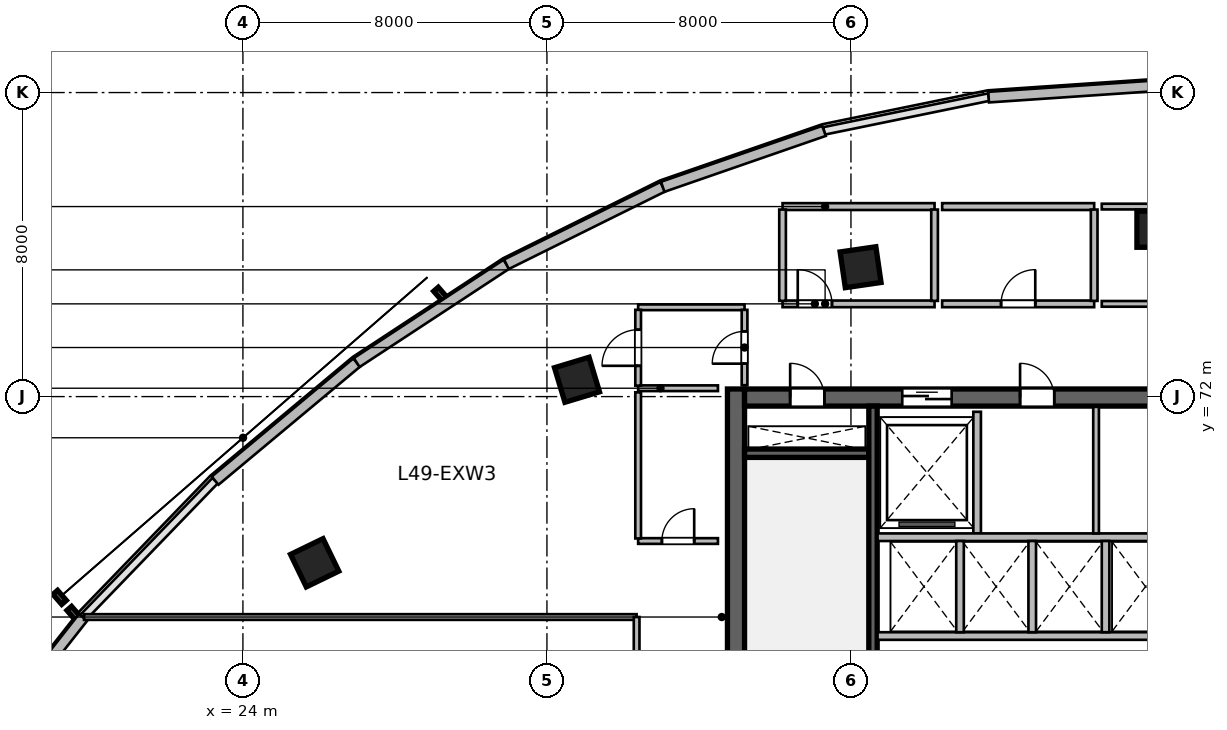
"""IFC4 building model, lengths in metres.
Left out: names, types, materials, properties, quantities, classifications, styles, units other than length and angle.
Written with IfcOpenShell. Run it as: python <this file> out.ifc"""

import sys

from ifc_helpers import new_model, si_unit, direction, frame, frame_2d, origin, origin_2d, place, context, subcontext, project, spatial, rectangle, extrude, source, transform, mapped, element, fill, save


model = new_model("IFC4")
c1 = context("Model", 3, precision=1e-05, world=origin(), true_north=direction((0.0, 1.0)))
c2 = subcontext(c1, "Body", "Model", "MODEL_VIEW")
j1 = project(units=[si_unit("LENGTHUNIT", "METRE"), si_unit("PLANEANGLEUNIT", "RADIAN")], contexts=[c1])
p1 = place(None, origin())
s1 = spatial("IfcSite", under=j1, at=p1, CompositionType="ELEMENT")
p2 = place(p1, origin())
s2 = spatial("IfcBuilding", under=s1, at=p2, CompositionType="ELEMENT")
p3 = place(p2, frame((0.0, 0.0, 204.0)))
s3 = spatial("IfcBuildingStorey", under=s2, at=p3, CompositionType="ELEMENT", Elevation=204.0)
m1 = source(origin(), c2, "Body", "SweptSolid", [
    extrude(rectangle(XDim=12.0, YDim=0.45, at=frame_2d((6.0, 0.0))), origin(), (0.0, 0.0, 1.0), 3.9),
])
p4 = place(p3, frame((36.975, 60.2, 0.0), z_axis=(0.0, 0.0, 1.0), x_axis=(0.0, 1.0, 0.0)))
e1 = element("IfcWall", 1, at=p4, inside=s3, PredefinedType="SHEAR", context=c2, shape_type="MappedRepresentation", body=[
    mapped(m1, transform((0.0, 0.0, 0.0), scale=1.0)),
])
m2 = source(origin(), c2, "Body", "SweptSolid", [
    extrude(rectangle(XDim=21.6, YDim=0.45, at=frame_2d((10.8, 0.0))), origin(), (0.0, 0.0, 1.0), 3.9),
])
p5 = place(p3, frame((37.2, 71.975, 0.0), z_axis=(0.0, 0.0, 1.0), x_axis=(1.0, 0.0, 0.0)))
e2 = element("IfcWall", 2, at=p5, inside=s3, PredefinedType="SHEAR", context=c2, shape_type="MappedRepresentation", body=[
    mapped(m2, transform((0.0, 0.0, 0.0), scale=1.0)),
])
p6 = place(p5, frame((1.2, 0.0, 0.0)))
e3 = element("IfcOpeningElement", 3, at=p6, cuts=e2, PredefinedType="OPENING", context=c2, shape_type="SweptSolid", body=[
    extrude(rectangle(XDim=0.9, YDim=2.1, at=frame_2d((0.45, 1.05))), frame((0.0, 0.235, 0.0), z_axis=(0.0, -1.0, 0.0), x_axis=(1.0, 0.0, 0.0)), (0.0, 0.0, 1.0), 0.47),
])
p7 = place(p5, frame((14.7, 0.0, 0.0)))
e4 = element("IfcOpeningElement", 4, at=p7, cuts=e2, PredefinedType="OPENING", context=c2, shape_type="SweptSolid", body=[
    extrude(rectangle(XDim=1.2, YDim=2.15, at=frame_2d((0.6, 1.075))), frame((0.0, 0.235, 0.0), z_axis=(0.0, -1.0, 0.0), x_axis=(1.0, 0.0, 0.0)), (0.0, 0.0, 1.0), 0.47),
])
p8 = place(p5, frame((4.15, 0.0, 0.0)))
e5 = element("IfcOpeningElement", 5, at=p8, cuts=e2, PredefinedType="OPENING", context=c2, shape_type="SweptSolid", body=[
    extrude(rectangle(XDim=1.3, YDim=2.15, at=frame_2d((0.65, 1.075))), frame((0.0, 0.235, 0.0), z_axis=(0.0, -1.0, 0.0), x_axis=(1.0, 0.0, 0.0)), (0.0, 0.0, 1.0), 0.47),
])
p9 = place(p5, frame((7.25, 0.0, 0.0)))
e6 = element("IfcOpeningElement", 6, at=p9, cuts=e2, PredefinedType="OPENING", context=c2, shape_type="SweptSolid", body=[
    extrude(rectangle(XDim=0.9, YDim=2.1, at=frame_2d((0.45, 1.05))), frame((0.0, 0.235, 0.0), z_axis=(0.0, -1.0, 0.0), x_axis=(1.0, 0.0, 0.0)), (0.0, 0.0, 1.0), 0.47),
])
p10 = place(p5, frame((10.95, 0.0, 0.0)))
e7 = element("IfcOpeningElement", 7, at=p10, cuts=e2, PredefinedType="OPENING", context=c2, shape_type="SweptSolid", body=[
    extrude(rectangle(XDim=0.9, YDim=2.1, at=frame_2d((0.45, 1.05))), frame((0.0, 0.235, 0.0), z_axis=(0.0, -1.0, 0.0), x_axis=(1.0, 0.0, 0.0)), (0.0, 0.0, 1.0), 0.47),
])
m3 = source(origin(), c2, "Body", "SweptSolid", [
    extrude(rectangle(XDim=3.27, YDim=0.22, at=frame_2d((1.635, 0.0))), origin(), (0.0, 0.0, 1.0), 3.9),
])
p11 = place(p3, frame((37.2, 70.51, 0.0), z_axis=(0.0, 0.0, 1.0), x_axis=(1.0, 0.0, 0.0)))
e8 = element("IfcWall", 8, at=p11, inside=s3, PredefinedType="SHEAR", context=c2, shape_type="MappedRepresentation", body=[
    mapped(m3, transform((0.0, 0.0, 0.0), scale=1.0)),
])
m4 = source(origin(), c2, "Body", "SweptSolid", [
    extrude(rectangle(XDim=11.1, YDim=0.22, at=frame_2d((5.55, 0.0))), origin(), (0.0, 0.0, 1.0), 3.9),
])
p12 = place(p3, frame((40.58, 60.65, 0.0), z_axis=(0.0, 0.0, 1.0), x_axis=(0.0, 1.0, 0.0)))
e9 = element("IfcWall", 9, at=p12, inside=s3, PredefinedType="SHEAR", context=c2, shape_type="MappedRepresentation", body=[
    mapped(m4, transform((0.0, 0.0, 0.0), scale=1.0)),
])
m5 = source(origin(), c2, "Body", "SweptSolid", [
    extrude(rectangle(XDim=0.95, YDim=0.95, at=origin_2d()), origin(), (0.0, 0.0, 1.0), 3.9),
])
for number, where, z_axis, x_axis in (
    (10, (25.888, 67.627, 0.0), (0.0, 0.0, 1.0), (-0.436, 0.9, 0.0)),
    (11, (32.791, 72.442, 0.0), (0.0, 0.0, 1.0), (-0.289, 0.957, 0.0)),
    (12, (40.253, 75.404, 0.0), (0.0, 0.0, 1.0), (-0.143, 0.99, 0.0)),
    (13, (48.0, 76.404, 0.0), (0.0, 0.0, 1.0), (0.0, 1.0, 0.0)),
):
    element("IfcColumn", number, at=place(p3, frame(where, z_axis=z_axis, x_axis=x_axis)), inside=s3, PredefinedType="COLUMN", context=c2, shape_type="MappedRepresentation", body=[
        mapped(m5, transform((0.0, 0.0, 0.0), scale=1.0)),
    ])
m6 = source(origin(), c2, "Body", "SweptSolid", [
    extrude(rectangle(XDim=5.153, YDim=0.28, at=frame_2d((2.577, 0.0))), origin(), (0.0, 0.0, 1.0), 3.64),
])
p13 = place(p3, frame((16.609, 62.14, 0.0), z_axis=(0.0, 0.0, 1.0), x_axis=(0.618179283891, 0.786037132054, 0.0)))
e14 = element("IfcWall", 14, at=p13, inside=s3, PredefinedType="SOLIDWALL", context=c2, shape_type="MappedRepresentation", body=[
    mapped(m6, transform((0.0, 0.0, 0.0), scale=1.0)),
])
m7 = source(origin(), c2, "Body", "SweptSolid", [
    extrude(rectangle(XDim=4.852, YDim=0.28, at=frame_2d((2.426, 0.0))), origin(), (0.0, 0.0, 1.0), 3.64),
])
p14 = place(p3, frame((23.268, 69.788, 0.0), z_axis=(0.0, 0.0, 1.0), x_axis=(0.767936605821, 0.640525853843, 0.0)))
e15 = element("IfcWall", 15, at=p14, inside=s3, PredefinedType="SOLIDWALL", context=c2, shape_type="MappedRepresentation", body=[
    mapped(m7, transform((0.0, 0.0, 0.0), scale=1.0)),
])
m8 = source(origin(), c2, "Body", "SweptSolid", [
    extrude(rectangle(XDim=4.713, YDim=0.28, at=frame_2d((2.356, 0.0))), origin(), (0.0, 0.0, 1.0), 3.64),
])
p15 = place(p3, frame((26.994, 72.896, 0.0), z_axis=(0.0, 0.0, 1.0), x_axis=(0.835974386457, 0.548768462275, 0.0)))
e16 = element("IfcWall", 16, at=p15, inside=s3, PredefinedType="SOLIDWALL", context=c2, shape_type="MappedRepresentation", body=[
    mapped(m8, transform((0.0, 0.0, 0.0), scale=1.0)),
])
m9 = source(origin(), c2, "Body", "SweptSolid", [
    extrude(rectangle(XDim=4.59, YDim=0.28, at=frame_2d((2.295, 0.0))), origin(), (0.0, 0.0, 1.0), 3.64),
])
p16 = place(p3, frame((30.934, 75.482, 0.0), z_axis=(0.0, 0.0, 1.0), x_axis=(0.895974834987, 0.444104824418, 0.0)))
e17 = element("IfcWall", 17, at=p16, inside=s3, PredefinedType="SOLIDWALL", context=c2, shape_type="MappedRepresentation", body=[
    mapped(m9, transform((0.0, 0.0, 0.0), scale=1.0)),
])
m10 = source(origin(), c2, "Body", "SweptSolid", [
    extrude(rectangle(XDim=4.492, YDim=0.28, at=frame_2d((2.246, 0.0))), origin(), (0.0, 0.0, 1.0), 3.64),
])
p17 = place(p3, frame((35.046, 77.52, 0.0), z_axis=(0.0, 0.0, 1.0), x_axis=(0.944872297412, 0.32743906545, 0.0)))
e18 = element("IfcWall", 18, at=p17, inside=s3, PredefinedType="SOLIDWALL", context=c2, shape_type="MappedRepresentation", body=[
    mapped(m10, transform((0.0, 0.0, 0.0), scale=1.0)),
])
m11 = source(origin(), c2, "Body", "SweptSolid", [
    extrude(rectangle(XDim=4.387, YDim=0.28, at=frame_2d((2.193, 0.0))), origin(), (0.0, 0.0, 1.0), 3.64),
])
p18 = place(p3, frame((43.623, 79.879, 0.0), z_axis=(0.0, 0.0, 1.0), x_axis=(0.997703650546, 0.06773053733, 0.0)))
e19 = element("IfcWall", 19, at=p18, inside=s3, PredefinedType="SOLIDWALL", context=c2, shape_type="MappedRepresentation", body=[
    mapped(m11, transform((0.0, 0.0, 0.0), scale=1.0)),
])
m12 = source(origin(), c2, "Body", "SweptSolid", [
    extrude(rectangle(XDim=3.2, YDim=0.2, at=frame_2d((1.6, 0.0))), origin(), (0.0, 0.0, 1.0), 3.64),
])
p19 = place(p3, frame((43.32, 68.4, 0.0), z_axis=(0.0, 0.0, 1.0), x_axis=(0.0, 1.0, 0.0)))
e20 = element("IfcWall", 20, at=p19, inside=s3, PredefinedType="SOLIDWALL", context=c2, shape_type="MappedRepresentation", body=[
    mapped(m12, transform((0.0, 0.0, 0.0), scale=1.0)),
])
m13 = source(origin(), c2, "Body", "SweptSolid", [
    extrude(rectangle(XDim=8.8, YDim=0.2, at=frame_2d((4.4, 0.0))), origin(), (0.0, 0.0, 1.0), 3.64),
])
p20 = place(p3, frame((40.7, 68.3, 0.0), z_axis=(0.0, 0.0, 1.0), x_axis=(1.0, 0.0, 0.0)))
e21 = element("IfcWall", 21, at=p20, inside=s3, PredefinedType="SOLIDWALL", context=c2, shape_type="MappedRepresentation", body=[
    mapped(m13, transform((0.0, 0.0, 0.0), scale=1.0)),
])
m14 = source(origin(), c2, "Body", "SweptSolid", [
    extrude(rectangle(XDim=3.33, YDim=0.15, at=frame_2d((1.665, 0.0))), origin(), (0.0, 0.0, 1.0), 3.64),
])
p21 = place(p3, frame((46.45, 68.4, 0.0), z_axis=(0.0, 0.0, 1.0), x_axis=(0.0, 1.0, 0.0)))
e22 = element("IfcWall", 22, at=p21, inside=s3, PredefinedType="PARTITIONING", context=c2, shape_type="MappedRepresentation", body=[
    mapped(m14, transform((0.0, 0.0, 0.0), scale=1.0)),
])
p22 = place(p3, frame((40.7, 65.7, 0.0), z_axis=(0.0, 0.0, 1.0), x_axis=(1.0, 0.0, 0.0)))
e23 = element("IfcWall", 23, at=p22, inside=s3, PredefinedType="SOLIDWALL", context=c2, shape_type="MappedRepresentation", body=[
    mapped(m13, transform((0.0, 0.0, 0.0), scale=1.0)),
])
m15 = source(origin(), c2, "Body", "SweptSolid", [
    extrude(rectangle(XDim=2.4, YDim=0.2, at=frame_2d((1.2, 0.0))), origin(), (0.0, 0.0, 1.0), 3.64),
])
for number, where, z_axis, x_axis in (
    (24, (42.87, 65.8, 0.0), (0.0, 0.0, 1.0), (0.0, 1.0, 0.0)),
    (25, (44.77, 65.8, 0.0), (0.0, 0.0, 1.0), (0.0, 1.0, 0.0)),
    (26, (46.7, 65.8, 0.0), (0.0, 0.0, 1.0), (0.0, 1.0, 0.0)),
):
    element("IfcWall", number, at=place(p3, frame(where, z_axis=z_axis, x_axis=x_axis)), inside=s3, PredefinedType="SOLIDWALL", context=c2, shape_type="MappedRepresentation", body=[
        mapped(m15, transform((0.0, 0.0, 0.0), scale=1.0)),
    ])
m16 = source(origin(), c2, "Body", "SweptSolid", [
    extrude(rectangle(XDim=2.1, YDim=0.15, at=frame_2d((1.05, 0.0))), origin(), (0.0, 0.0, 1.0), 3.64),
])
p23 = place(p3, frame((34.4, 72.22, 0.0), z_axis=(0.0, 0.0, 1.0), x_axis=(1.0, 0.0, 0.0)))
e27 = element("IfcWall", 27, at=p23, inside=s3, PredefinedType="PARTITIONING", context=c2, shape_type="MappedRepresentation", body=[
    mapped(m16, transform((0.0, 0.0, 0.0), scale=1.0)),
])
m17 = source(origin(), c2, "Body", "SweptSolid", [
    extrude(rectangle(XDim=2.8, YDim=0.15, at=frame_2d((1.4, 0.0))), origin(), (0.0, 0.0, 1.0), 3.64),
])
p24 = place(p3, frame((34.4, 74.35, 0.0), z_axis=(0.0, 0.0, 1.0), x_axis=(1.0, 0.0, 0.0)))
e28 = element("IfcWall", 28, at=p24, inside=s3, PredefinedType="PARTITIONING", context=c2, shape_type="MappedRepresentation", body=[
    mapped(m17, transform((0.0, 0.0, 0.0), scale=1.0)),
])
m18 = source(origin(), c2, "Body", "SweptSolid", [
    extrude(rectangle(XDim=1.995, YDim=0.15, at=frame_2d((0.998, 0.0))), origin(), (0.0, 0.0, 1.0), 3.64),
])
p25 = place(p3, frame((34.4, 72.288, 0.0), z_axis=(0.0, 0.0, 1.0), x_axis=(0.0, 1.0, 0.0)))
e29 = element("IfcWall", 29, at=p25, inside=s3, PredefinedType="PARTITIONING", context=c2, shape_type="MappedRepresentation", body=[
    mapped(m18, transform((0.0, 0.0, 0.0), scale=1.0)),
])
p26 = place(p25, frame((0.522, 0.0, 0.0)))
e30 = element("IfcOpeningElement", 30, at=p26, cuts=e29, PredefinedType="OPENING", context=c2, shape_type="SweptSolid", body=[
    extrude(rectangle(XDim=0.95, YDim=2.1, at=frame_2d((0.475, 1.05))), frame((0.0, 0.085, 0.0), z_axis=(0.0, -1.0, 0.0), x_axis=(1.0, 0.0, 0.0)), (0.0, 0.0, 1.0), 0.17),
])
m19 = source(origin(), c2, "Body", "SweptSolid", [
    extrude(rectangle(XDim=1.982, YDim=0.15, at=frame_2d((0.991, 0.0))), origin(), (0.0, 0.0, 1.0), 3.64),
])
p27 = place(p3, frame((37.2, 72.3, 0.0), z_axis=(0.0, 0.0, 1.0), x_axis=(0.0, 1.0, 0.0)))
e31 = element("IfcWall", 31, at=p27, inside=s3, PredefinedType="PARTITIONING", context=c2, shape_type="MappedRepresentation", body=[
    mapped(m19, transform((0.0, 0.0, 0.0), scale=1.0)),
])
p28 = place(p27, frame((0.566, 0.0, 0.0)))
e32 = element("IfcOpeningElement", 32, at=p28, cuts=e31, PredefinedType="OPENING", context=c2, shape_type="SweptSolid", body=[
    extrude(rectangle(XDim=0.85, YDim=2.1, at=frame_2d((0.425, 1.05))), frame((0.0, 0.085, 0.0), z_axis=(0.0, -1.0, 0.0), x_axis=(1.0, 0.0, 0.0)), (0.0, 0.0, 1.0), 0.17),
])
p29 = place(p3, frame((34.4, 68.2, 0.0), z_axis=(0.0, 0.0, 1.0), x_axis=(1.0, 0.0, 0.0)))
e33 = element("IfcWall", 33, at=p29, inside=s3, PredefinedType="PARTITIONING", context=c2, shape_type="MappedRepresentation", body=[
    mapped(m16, transform((0.0, 0.0, 0.0), scale=1.0)),
])
p30 = place(p29, frame((0.625, 0.0, 0.0)))
e34 = element("IfcOpeningElement", 34, at=p30, cuts=e33, PredefinedType="OPENING", context=c2, shape_type="SweptSolid", body=[
    extrude(rectangle(XDim=0.85, YDim=2.1, at=frame_2d((0.425, 1.05))), frame((0.0, 0.085, 0.0), z_axis=(0.0, -1.0, 0.0), x_axis=(1.0, 0.0, 0.0)), (0.0, 0.0, 1.0), 0.17),
])
m20 = source(origin(), c2, "Body", "SweptSolid", [
    extrude(rectangle(XDim=3.845, YDim=0.15, at=frame_2d((1.922, 0.0))), origin(), (0.0, 0.0, 1.0), 3.64),
])
p31 = place(p3, frame((34.4, 68.268, 0.0), z_axis=(0.0, 0.0, 1.0), x_axis=(0.0, 1.0, 0.0)))
e35 = element("IfcWall", 35, at=p31, inside=s3, PredefinedType="PARTITIONING", context=c2, shape_type="MappedRepresentation", body=[
    mapped(m20, transform((0.0, 0.0, 0.0), scale=1.0)),
])
m21 = source(origin(), c2, "Body", "SweptSolid", [
    extrude(rectangle(XDim=4.0, YDim=0.175, at=frame_2d((2.0, 0.0))), origin(), (0.0, 0.0, 1.0), 3.64),
])
p32 = place(p3, frame((38.2, 74.44, 0.0), z_axis=(0.0, 0.0, 1.0), x_axis=(1.0, 0.0, 0.0)))
e36 = element("IfcWall", 36, at=p32, inside=s3, PredefinedType="PARTITIONING", context=c2, shape_type="MappedRepresentation", body=[
    mapped(m21, transform((0.0, 0.0, 0.0), scale=1.0)),
])
p33 = place(p32, frame((0.4, 0.0, 0.0)))
e37 = element("IfcOpeningElement", 37, at=p33, cuts=e36, PredefinedType="OPENING", context=c2, shape_type="SweptSolid", body=[
    extrude(rectangle(XDim=0.9, YDim=2.08, at=frame_2d((0.45, 1.04))), frame((0.0, 0.098, 0.0), z_axis=(0.0, -1.0, 0.0), x_axis=(1.0, 0.0, 0.0)), (0.0, 0.0, 1.0), 0.195),
])
m22 = source(origin(), c2, "Body", "SweptSolid", [
    extrude(rectangle(XDim=4.0, YDim=0.18, at=frame_2d((2.0, 0.0))), origin(), (0.0, 0.0, 1.0), 3.64),
])
p34 = place(p3, frame((38.2, 77.0, 0.0), z_axis=(0.0, 0.0, 1.0), x_axis=(1.0, 0.0, 0.0)))
e38 = element("IfcWall", 38, at=p34, inside=s3, PredefinedType="PLUMBINGWALL", context=c2, shape_type="MappedRepresentation", body=[
    mapped(m22, transform((0.0, 0.0, 0.0), scale=1.0)),
])
m23 = source(origin(), c2, "Body", "SweptSolid", [
    extrude(rectangle(XDim=2.403, YDim=0.175, at=frame_2d((1.201, 0.0))), origin(), (0.0, 0.0, 1.0), 3.64),
])
for number, where, z_axis, x_axis in (
    (39, (38.2, 74.519, 0.0), (0.0, 0.0, 1.0), (0.0, 1.0, 0.0)),
    (40, (42.2, 74.519, 0.0), (0.0, 0.0, 1.0), (0.0, 1.0, 0.0)),
):
    element("IfcWall", number, at=place(p3, frame(where, z_axis=z_axis, x_axis=x_axis)), inside=s3, PredefinedType="PARTITIONING", context=c2, shape_type="MappedRepresentation", body=[
        mapped(m23, transform((0.0, 0.0, 0.0), scale=1.0)),
    ])
p35 = place(p3, frame((42.4, 74.44, 0.0), z_axis=(0.0, 0.0, 1.0), x_axis=(1.0, 0.0, 0.0)))
e41 = element("IfcWall", 41, at=p35, inside=s3, PredefinedType="PARTITIONING", context=c2, shape_type="MappedRepresentation", body=[
    mapped(m21, transform((0.0, 0.0, 0.0), scale=1.0)),
])
p36 = place(p35, frame((1.55, 0.0, 0.0)))
e42 = element("IfcOpeningElement", 42, at=p36, cuts=e41, PredefinedType="OPENING", context=c2, shape_type="SweptSolid", body=[
    extrude(rectangle(XDim=0.9, YDim=2.08, at=frame_2d((0.45, 1.04))), frame((0.0, 0.098, 0.0), z_axis=(0.0, -1.0, 0.0), x_axis=(1.0, 0.0, 0.0)), (0.0, 0.0, 1.0), 0.195),
])
p37 = place(p3, frame((42.4, 77.0, 0.0), z_axis=(0.0, 0.0, 1.0), x_axis=(1.0, 0.0, 0.0)))
e43 = element("IfcWall", 43, at=p37, inside=s3, PredefinedType="PLUMBINGWALL", context=c2, shape_type="MappedRepresentation", body=[
    mapped(m22, transform((0.0, 0.0, 0.0), scale=1.0)),
])
p38 = place(p3, frame((46.4, 74.519, 0.0), z_axis=(0.0, 0.0, 1.0), x_axis=(0.0, 1.0, 0.0)))
e44 = element("IfcWall", 44, at=p38, inside=s3, PredefinedType="PARTITIONING", context=c2, shape_type="MappedRepresentation", body=[
    mapped(m23, transform((0.0, 0.0, 0.0), scale=1.0)),
])
m24 = source(origin(), c2, "Body", "SweptSolid", [
    extrude(rectangle(XDim=4.4, YDim=0.15, at=frame_2d((2.2, 0.0))), origin(), (0.0, 0.0, 1.0), 3.64),
])
p39 = place(p3, frame((46.6, 74.44, 0.0), z_axis=(0.0, 0.0, 1.0), x_axis=(1.0, 0.0, 0.0)))
e45 = element("IfcWall", 45, at=p39, inside=s3, PredefinedType="PARTITIONING", context=c2, shape_type="MappedRepresentation", body=[
    mapped(m24, transform((0.0, 0.0, 0.0), scale=1.0)),
])
p40 = place(p39, frame((1.725, 0.0, 0.0)))
e46 = element("IfcOpeningElement", 46, at=p40, cuts=e45, PredefinedType="OPENING", context=c2, shape_type="SweptSolid", body=[
    extrude(rectangle(XDim=0.95, YDim=2.1, at=frame_2d((0.475, 1.05))), frame((0.0, 0.085, 0.0), z_axis=(0.0, -1.0, 0.0), x_axis=(1.0, 0.0, 0.0)), (0.0, 0.0, 1.0), 0.17),
])
p41 = place(p3, frame((46.6, 77.0, 0.0), z_axis=(0.0, 0.0, 1.0), x_axis=(1.0, 0.0, 0.0)))
e47 = element("IfcWall", 47, at=p41, inside=s3, PredefinedType="PARTITIONING", context=c2, shape_type="MappedRepresentation", body=[
    mapped(m24, transform((0.0, 0.0, 0.0), scale=1.0)),
])
m25 = source(origin(), c2, "Body", "SweptSolid", [
    extrude(rectangle(XDim=14.542, YDim=0.15, at=frame_2d((7.271, 0.0))), origin(), (0.0, 0.0, 1.0), 3.64),
])
p42 = place(p3, frame((19.818, 66.2, 0.0), z_axis=(0.0, 0.0, 1.0), x_axis=(1.0, 0.0, 0.0)))
e48 = element("IfcWall", 48, at=p42, inside=s3, PredefinedType="PARTITIONING", context=c2, shape_type="MappedRepresentation", body=[
    mapped(m25, transform((0.0, 0.0, 0.0), scale=1.0)),
])
m26 = source(origin(), c2, "Body", "SweptSolid", [
    extrude(rectangle(XDim=4.7, YDim=0.15, at=frame_2d((2.35, 0.0))), origin(), (0.0, 0.0, 1.0), 3.64),
])
p43 = place(p3, frame((34.36, 61.5, 0.0), z_axis=(0.0, 0.0, 1.0), x_axis=(0.0, 1.0, 0.0)))
e49 = element("IfcWall", 49, at=p43, inside=s3, PredefinedType="PARTITIONING", context=c2, shape_type="MappedRepresentation", body=[
    mapped(m26, transform((0.0, 0.0, 0.0), scale=1.0)),
])
p44 = place(p43, frame((1.875, 0.0, 0.0)))
e50 = element("IfcOpeningElement", 50, at=p44, cuts=e49, PredefinedType="OPENING", context=c2, shape_type="SweptSolid", body=[
    extrude(rectangle(XDim=0.95, YDim=2.1, at=frame_2d((0.475, 1.05))), frame((0.0, 0.085, 0.0), z_axis=(0.0, -1.0, 0.0), x_axis=(1.0, 0.0, 0.0)), (0.0, 0.0, 1.0), 0.17),
])
m27 = source(origin(), c2, "Body", "SweptSolid", [
    extrude(rectangle(XDim=0.9, YDim=2.1, at=frame_2d((0.45, 1.05))), frame((0.0, 0.025, 0.0), z_axis=(0.0, -1.0, 0.0), x_axis=(1.0, 0.0, 0.0)), (0.0, 0.0, 1.0), 0.05),
])
p45 = place(p6, origin())
e51 = element("IfcDoor", 51, at=p45, inside=s3, OperationType="SINGLE_SWING_LEFT", PredefinedType="DOOR", context=c2, shape_type="MappedRepresentation", body=[
    mapped(m27, transform((0.0, 0.0, 0.0), scale=1.0)),
])
fill(e3, e51)
m28 = source(origin(), c2, "Body", "SweptSolid", [
    extrude(rectangle(XDim=1.3, YDim=2.15, at=frame_2d((0.65, 1.075))), frame((0.0, 0.025, 0.0), z_axis=(0.0, -1.0, 0.0), x_axis=(1.0, 0.0, 0.0)), (0.0, 0.0, 1.0), 0.05),
])
p46 = place(p8, origin())
e52 = element("IfcDoor", 52, at=p46, inside=s3, OperationType="DOUBLE_DOOR_SLIDING", PredefinedType="DOOR", context=c2, shape_type="MappedRepresentation", body=[
    mapped(m28, transform((0.0, 0.0, 0.0), scale=1.0)),
])
fill(e5, e52)
p47 = place(p9, origin())
e53 = element("IfcDoor", 53, at=p47, inside=s3, OperationType="SINGLE_SWING_LEFT", PredefinedType="DOOR", context=c2, shape_type="MappedRepresentation", body=[
    mapped(m27, transform((0.0, 0.0, 0.0), scale=1.0)),
])
fill(e6, e53)
m29 = source(origin(), c2, "Body", "SweptSolid", [
    extrude(rectangle(XDim=0.85, YDim=2.1, at=frame_2d((0.425, 1.05))), frame((0.0, 0.025, 0.0), z_axis=(0.0, -1.0, 0.0), x_axis=(1.0, 0.0, 0.0)), (0.0, 0.0, 1.0), 0.05),
])
p48 = place(p28, origin())
e54 = element("IfcDoor", 54, at=p48, inside=s3, OperationType="SINGLE_SWING_LEFT", PredefinedType="DOOR", context=c2, shape_type="MappedRepresentation", body=[
    mapped(m29, transform((0.0, 0.0, 0.0), scale=1.0)),
])
fill(e32, e54)
p49 = place(p30, origin())
e55 = element("IfcDoor", 55, at=p49, inside=s3, OperationType="SINGLE_SWING_RIGHT", PredefinedType="DOOR", context=c2, shape_type="MappedRepresentation", body=[
    mapped(m29, transform((0.0, 0.0, 0.0), scale=1.0)),
])
fill(e34, e55)
m30 = source(origin(), c2, "Body", "SweptSolid", [
    extrude(rectangle(XDim=0.9, YDim=2.08, at=frame_2d((0.45, 1.04))), frame((0.0, 0.025, 0.0), z_axis=(0.0, -1.0, 0.0), x_axis=(1.0, 0.0, 0.0)), (0.0, 0.0, 1.0), 0.05),
])
p50 = place(p33, origin())
e56 = element("IfcDoor", 56, at=p50, inside=s3, OperationType="SINGLE_SWING_LEFT", PredefinedType="DOOR", context=c2, shape_type="MappedRepresentation", body=[
    mapped(m30, transform((0.0, 0.0, 0.0), scale=1.0)),
])
fill(e37, e56)
p51 = place(p36, origin())
e57 = element("IfcDoor", 57, at=p51, inside=s3, OperationType="SINGLE_SWING_RIGHT", PredefinedType="DOOR", context=c2, shape_type="MappedRepresentation", body=[
    mapped(m30, transform((0.0, 0.0, 0.0), scale=1.0)),
])
fill(e42, e57)
m31 = source(origin(), c2, "Body", "SweptSolid", [
    extrude(rectangle(XDim=0.95, YDim=2.1, at=frame_2d((0.475, 1.05))), frame((0.0, 0.025, 0.0), z_axis=(0.0, -1.0, 0.0), x_axis=(1.0, 0.0, 0.0)), (0.0, 0.0, 1.0), 0.05),
])
p52 = place(p26, origin())
e58 = element("IfcDoor", 58, at=p52, inside=s3, OperationType="SINGLE_SWING_LEFT", PredefinedType="DOOR", context=c2, shape_type="MappedRepresentation", body=[
    mapped(m31, transform((0.0, 0.0, 0.0), scale=1.0)),
])
fill(e30, e58)
save(model, sys.argv[1])
